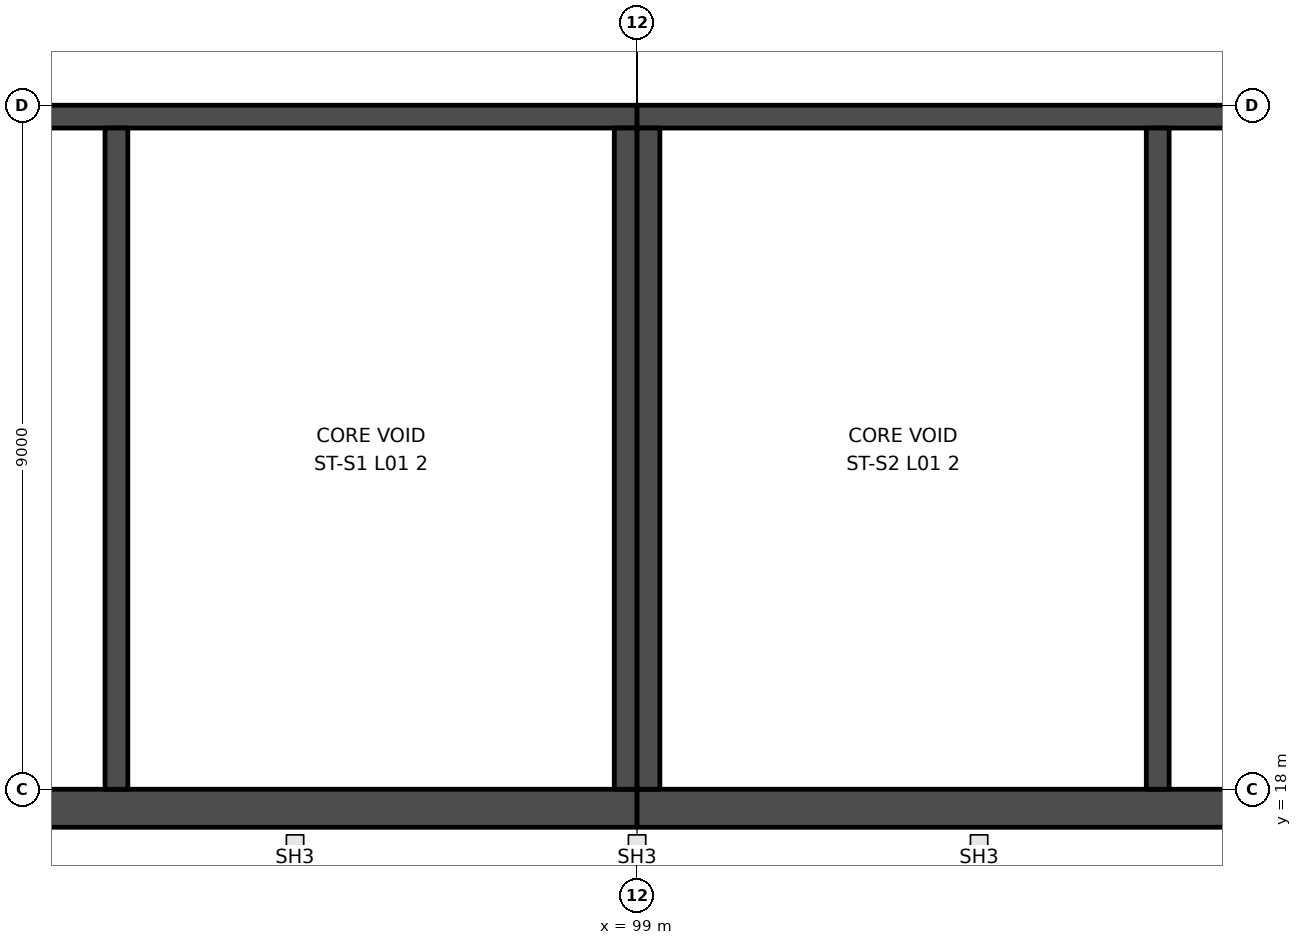
"""IFC4 building model, lengths in metres.
Left out: names, types, materials, properties, quantities, classifications, styles, units other than length and angle.
Written with IfcOpenShell. Run it as: python <this file> out.ifc"""

import sys

from ifc_helpers import new_model, si_unit, direction, frame, frame_2d, origin, place, context, subcontext, project, spatial, rectangle, extrude, element, save


model = new_model("IFC4")
c1 = context("Model", 3, precision=1e-05, world=origin(), true_north=direction((0.0, 1.0)))
c2 = subcontext(c1, "Body", "Model", "MODEL_VIEW")
j1 = project(units=[si_unit("LENGTHUNIT", "METRE"), si_unit("PLANEANGLEUNIT", "RADIAN")], contexts=[c1])
p1 = place(None, origin())
s1 = spatial("IfcSite", under=j1, at=p1, CompositionType="ELEMENT")
p2 = place(p1, origin())
s2 = spatial("IfcBuilding", under=s1, at=p2, CompositionType="ELEMENT")
p3 = place(p2, frame((0.0, 0.0, 7.0)))
s3 = spatial("IfcBuildingStorey", under=s2, at=p3, CompositionType="ELEMENT", Elevation=7.0)
p4 = place(p3, frame((81.0, 26.85, 0.0), z_axis=(0.0, 0.0, 1.0), x_axis=(1.0, 0.0, 0.0)))
e1 = element("IfcWall", 1, at=p4, inside=s3, PredefinedType="SHEAR", context=c2, shape_type="SweptSolid", body=[
    extrude(rectangle(XDim=18.0, YDim=0.3, at=frame_2d((9.0, 0.0))), origin(), (0.0, 0.0, 1.0), 4.5),
])
p5 = place(p4, frame((8.6, 0.0, 0.0)))
e2 = element("IfcOpeningElement", 2, at=p5, cuts=e1, PredefinedType="OPENING", context=c2, shape_type="SweptSolid", body=[
    extrude(rectangle(XDim=1.2, YDim=2.1, at=frame_2d((0.6, 1.05))), frame((0.0, 0.16, 0.0), z_axis=(0.0, -1.0, 0.0), x_axis=(1.0, 0.0, 0.0)), (0.0, 0.0, 1.0), 0.32),
])
p6 = place(p3, frame((81.0, 17.75, 0.0), z_axis=(0.0, 0.0, 1.0), x_axis=(1.0, 0.0, 0.0)))
e3 = element("IfcWall", 3, at=p6, inside=s3, PredefinedType="SHEAR", context=c2, shape_type="SweptSolid", body=[
    extrude(rectangle(XDim=18.0, YDim=0.5, at=frame_2d((9.0, 0.0))), origin(), (0.0, 0.0, 1.0), 4.5),
])
for number, where, z_axis, x_axis in (
    (4, (98.85, 26.7, 0.0), (0.0, 0.0, 1.0), (0.0, -1.0, 0.0)),
    (5, (92.15, 26.7, 0.0), (0.0, 0.0, 1.0), (0.0, -1.0, 0.0)),
):
    element("IfcWall", number, at=place(p3, frame(where, z_axis=z_axis, x_axis=x_axis)), inside=s3, PredefinedType="SHEAR", context=c2, shape_type="SweptSolid", body=[
        extrude(rectangle(XDim=8.7, YDim=0.3, at=frame_2d((4.35, 0.0))), origin(), (0.0, 0.0, 1.0), 4.5),
    ])
p7 = place(p3, frame((117.0, 26.85, 0.0), z_axis=(0.0, 0.0, 1.0), x_axis=(-1.0, 0.0, 0.0)))
e6 = element("IfcWall", 6, at=p7, inside=s3, PredefinedType="SHEAR", context=c2, shape_type="SweptSolid", body=[
    extrude(rectangle(XDim=18.0, YDim=0.3, at=frame_2d((9.0, 0.0))), origin(), (0.0, 0.0, 1.0), 4.5),
])
p8 = place(p7, frame((1.5, 0.0, 0.0)))
e7 = element("IfcOpeningElement", 7, at=p8, cuts=e6, PredefinedType="OPENING", context=c2, shape_type="SweptSolid", body=[
    extrude(rectangle(XDim=1.2, YDim=2.1, at=frame_2d((0.6, 1.05))), frame((0.0, 0.16, 0.0), z_axis=(0.0, -1.0, 0.0), x_axis=(1.0, 0.0, 0.0)), (0.0, 0.0, 1.0), 0.32),
])
p9 = place(p3, frame((117.0, 17.75, 0.0), z_axis=(0.0, 0.0, 1.0), x_axis=(-1.0, 0.0, 0.0)))
e8 = element("IfcWall", 8, at=p9, inside=s3, PredefinedType="SHEAR", context=c2, shape_type="SweptSolid", body=[
    extrude(rectangle(XDim=18.0, YDim=0.5, at=frame_2d((9.0, 0.0))), origin(), (0.0, 0.0, 1.0), 4.5),
])
for number, where, z_axis, x_axis in (
    (9, (99.15, 26.7, 0.0), (0.0, 0.0, 1.0), (0.0, -1.0, 0.0)),
    (10, (105.85, 26.7, 0.0), (0.0, 0.0, 1.0), (0.0, -1.0, 0.0)),
):
    element("IfcWall", number, at=place(p3, frame(where, z_axis=z_axis, x_axis=x_axis)), inside=s3, PredefinedType="SHEAR", context=c2, shape_type="SweptSolid", body=[
        extrude(rectangle(XDim=8.7, YDim=0.3, at=frame_2d((4.35, 0.0))), origin(), (0.0, 0.0, 1.0), 4.5),
    ])
save(model, sys.argv[1])
